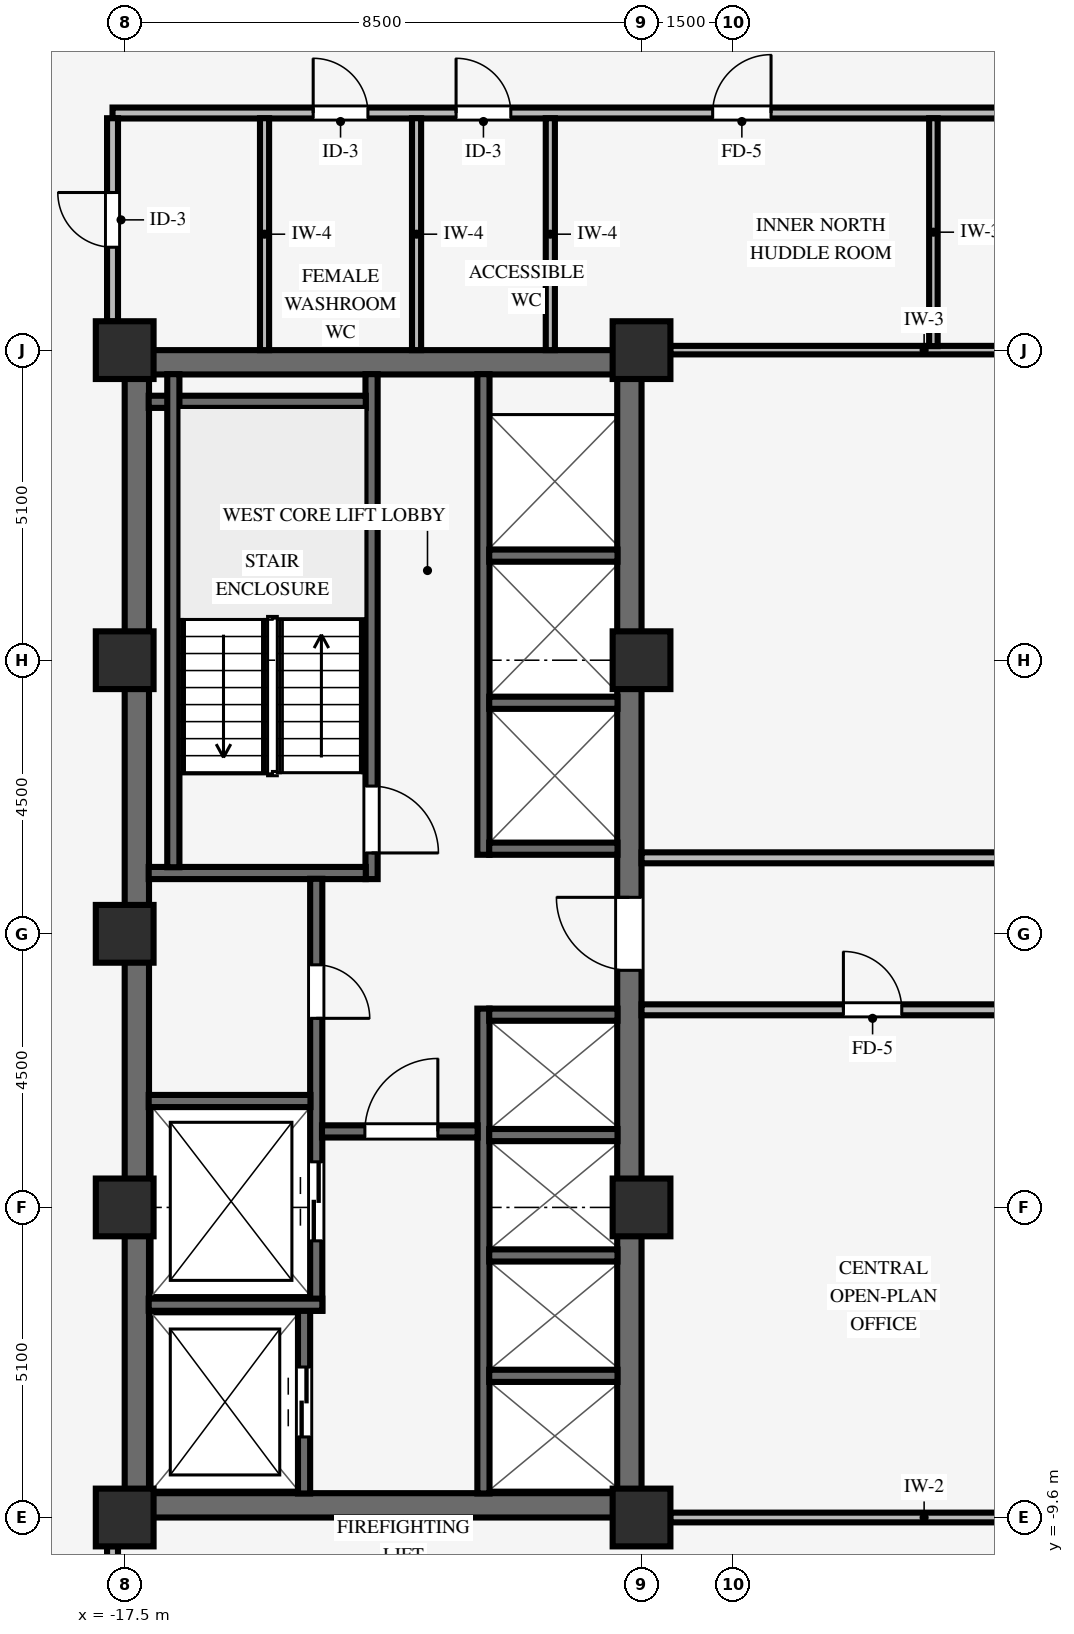
"""IFC4 building model, lengths in metres.
Left out: names, types, materials, properties, quantities, classifications, styles, units other than length and angle.
Written with IfcOpenShell. Run it as: python <this file> out.ifc"""

import sys

from ifc_helpers import new_model, si_unit, direction, frame, frame_2d, origin, origin_2d, place, context, subcontext, project, spatial, rectangle, extrude, source, transform, mapped, element, fill, save


model = new_model("IFC4")
c1 = context("Model", 3, precision=1e-05, world=origin(), true_north=direction((0.0, 1.0)))
c2 = subcontext(c1, "Body", "Model", "MODEL_VIEW")
j1 = project(units=[si_unit("LENGTHUNIT", "METRE"), si_unit("PLANEANGLEUNIT", "RADIAN")], contexts=[c1])
p1 = place(None, origin())
s1 = spatial("IfcSite", under=j1, at=p1, CompositionType="ELEMENT")
p2 = place(p1, origin())
s2 = spatial("IfcBuilding", under=s1, at=p2, CompositionType="ELEMENT")
p3 = place(p2, frame((0.0, 0.0, 123.85)))
s3 = spatial("IfcBuildingStorey", under=s2, at=p3, CompositionType="ELEMENT", Elevation=123.85)
for number, where, z_axis, x_axis in (
    (1, (-17.5, -9.4, 0.0), (0.0, 0.0, 1.0), (1.0, 0.0, 0.0)),
    (2, (-17.5, 9.4, 0.0), (0.0, 0.0, 1.0), (1.0, 0.0, 0.0)),
):
    element("IfcWall", number, at=place(p3, frame(where, z_axis=z_axis, x_axis=x_axis)), inside=s3, PredefinedType="SHEAR", context=c2, shape_type="SweptSolid", body=[
        extrude(rectangle(XDim=8.5, YDim=0.4, at=frame_2d((4.25, 0.0))), origin(), (0.0, 0.0, 1.0), 3.37),
    ])
p4 = place(p3, frame((-17.3, -9.205, 0.0), z_axis=(0.0, 0.0, 1.0), x_axis=(0.0, 1.0, 0.0)))
e3 = element("IfcWall", 3, at=p4, inside=s3, PredefinedType="SHEAR", context=c2, shape_type="SweptSolid", body=[
    extrude(rectangle(XDim=18.41, YDim=0.4, at=frame_2d((9.205, 0.0))), origin(), (0.0, 0.0, 1.0), 3.37),
])
p5 = place(p3, frame((-9.2, -9.205, 0.0), z_axis=(0.0, 0.0, 1.0), x_axis=(0.0, 1.0, 0.0)))
e4 = element("IfcWall", 4, at=p5, inside=s3, PredefinedType="SHEAR", context=c2, shape_type="SweptSolid", body=[
    extrude(rectangle(XDim=18.41, YDim=0.4, at=frame_2d((9.205, 0.0))), origin(), (0.0, 0.0, 1.0), 3.37),
])
p6 = place(p5, frame((8.605, 0.0, 0.0)))
e5 = element("IfcOpeningElement", 5, at=p6, cuts=e4, PredefinedType="OPENING", context=c2, shape_type="SweptSolid", body=[
    extrude(rectangle(XDim=1.2, YDim=2.15, at=frame_2d((0.6, 1.075))), frame((0.0, 0.21, 0.0), z_axis=(0.0, -1.0, 0.0), x_axis=(1.0, 0.0, 0.0)), (0.0, 0.0, 1.0), 0.42),
])
for number, where, z_axis, x_axis in (
    (6, (-17.5, -9.6, 0.0), (0.0, 0.0, 1.0), (1.0, 0.0, 0.0)),
    (7, (-17.5, -4.5, 0.0), (0.0, 0.0, 1.0), (1.0, 0.0, 0.0)),
    (8, (-17.5, 4.5, 0.0), (0.0, 0.0, 1.0), (1.0, 0.0, 0.0)),
    (9, (-17.5, 9.6, 0.0), (0.0, 0.0, 1.0), (1.0, 0.0, 0.0)),
    (10, (-9.0, -9.6, 0.0), (0.0, 0.0, 1.0), (1.0, 0.0, 0.0)),
    (11, (-9.0, -4.5, 0.0), (0.0, 0.0, 1.0), (1.0, 0.0, 0.0)),
    (12, (-9.0, 4.5, 0.0), (0.0, 0.0, 1.0), (1.0, 0.0, 0.0)),
    (13, (-9.0, 9.6, 0.0), (0.0, 0.0, 1.0), (1.0, 0.0, 0.0)),
    (14, (-17.5, 0.0, 0.0), (0.0, 0.0, 1.0), (1.0, 0.0, 0.0)),
):
    element("IfcColumn", number, at=place(p3, frame(where, z_axis=z_axis, x_axis=x_axis)), inside=s3, PredefinedType="COLUMN", context=c2, shape_type="SweptSolid", body=[
        extrude(rectangle(XDim=0.95, YDim=0.95, at=origin_2d()), origin(), (0.0, 0.0, 1.0), 3.37),
    ])
p7 = place(p3, frame((-13.44, 0.9, 0.0), z_axis=(0.0, 0.0, 1.0), x_axis=(0.0, 1.0, 0.0)))
e15 = element("IfcWall", 15, at=p7, inside=s3, PredefinedType="SHEAR", context=c2, shape_type="SweptSolid", body=[
    extrude(rectangle(XDim=8.305, YDim=0.2, at=frame_2d((4.153, 0.0))), origin(), (0.0, 0.0, 1.0), 3.37),
])
p8 = place(p7, frame((1.53, 0.0, 0.0), z_axis=(0.0, 0.0, 1.0), x_axis=(-1.0, 0.0, 0.0)))
e16 = element("IfcOpeningElement", 16, at=p8, cuts=e15, PredefinedType="OPENING", context=c2, shape_type="SweptSolid", body=[
    extrude(rectangle(XDim=1.1, YDim=2.15, at=frame_2d((0.55, 1.075))), frame((0.0, 0.11, 0.0), z_axis=(0.0, -1.0, 0.0), x_axis=(1.0, 0.0, 0.0)), (0.0, 0.0, 1.0), 0.22),
])
for number, where, z_axis, x_axis in (
    (17, (-17.105, 1.0, 0.0), (0.0, 0.0, 1.0), (1.0, 0.0, 0.0)),
    (18, (-17.105, 8.75, 0.0), (0.0, 0.0, 1.0), (1.0, 0.0, 0.0)),
):
    element("IfcWall", number, at=place(p3, frame(where, z_axis=z_axis, x_axis=x_axis)), inside=s3, PredefinedType="SHEAR", context=c2, shape_type="SweptSolid", body=[
        extrude(rectangle(XDim=3.57, YDim=0.2, at=frame_2d((1.785, 0.0))), origin(), (0.0, 0.0, 1.0), 3.37),
    ])
p9 = place(p3, frame((-16.7, 1.095, 0.0), z_axis=(0.0, 0.0, 1.0), x_axis=(0.0, 1.0, 0.0)))
e19 = element("IfcWall", 19, at=p9, inside=s3, PredefinedType="SHEAR", context=c2, shape_type="SweptSolid", body=[
    extrude(rectangle(XDim=8.11, YDim=0.2, at=frame_2d((4.055, 0.0))), origin(), (0.0, 0.0, 1.0), 3.37),
])
p10 = place(p3, frame((-14.55, -9.205, 0.0), z_axis=(0.0, 0.0, 1.0), x_axis=(0.0, 1.0, 0.0)))
e20 = element("IfcWall", 20, at=p10, inside=s3, PredefinedType="SHEAR", context=c2, shape_type="SweptSolid", body=[
    extrude(rectangle(XDim=3.01, YDim=0.2, at=frame_2d((1.505, 0.0))), origin(), (0.0, 0.0, 1.0), 3.37),
])
p11 = place(p10, frame((0.93, 0.0, 0.0)))
e21 = element("IfcOpeningElement", 21, at=p11, cuts=e20, PredefinedType="OPENING", context=c2, shape_type="SweptSolid", body=[
    extrude(rectangle(XDim=1.15, YDim=2.15, at=frame_2d((0.575, 1.075))), frame((0.0, 0.11, 0.0), z_axis=(0.0, -1.0, 0.0), x_axis=(1.0, 0.0, 0.0)), (0.0, 0.0, 1.0), 0.22),
])
p12 = place(p3, frame((-14.35, -6.2, 0.0), z_axis=(0.0, 0.0, 1.0), x_axis=(0.0, 1.0, 0.0)))
e22 = element("IfcWall", 22, at=p12, inside=s3, PredefinedType="SHEAR", context=c2, shape_type="SweptSolid", body=[
    extrude(rectangle(XDim=7.105, YDim=0.2, at=frame_2d((3.552, 0.0))), origin(), (0.0, 0.0, 1.0), 3.37),
])
p13 = place(p12, frame((5.69, 0.0, 0.0), z_axis=(0.0, 0.0, 1.0), x_axis=(-1.0, 0.0, 0.0)))
e23 = element("IfcOpeningElement", 23, at=p13, cuts=e22, PredefinedType="OPENING", context=c2, shape_type="SweptSolid", body=[
    extrude(rectangle(XDim=0.88, YDim=2.1, at=frame_2d((0.44, 1.05))), frame((0.0, 0.11, 0.0), z_axis=(0.0, -1.0, 0.0), x_axis=(1.0, 0.0, 0.0)), (0.0, 0.0, 1.0), 0.22),
])
p14 = place(p12, frame((1.15, 0.0, 0.0)))
e24 = element("IfcOpeningElement", 24, at=p14, cuts=e22, PredefinedType="OPENING", context=c2, shape_type="SweptSolid", body=[
    extrude(rectangle(XDim=1.3, YDim=2.2, at=frame_2d((0.65, 1.1))), frame((0.0, 0.11, 0.0), z_axis=(0.0, -1.0, 0.0), x_axis=(1.0, 0.0, 0.0)), (0.0, 0.0, 1.0), 0.22),
])
p15 = place(p3, frame((-17.105, -6.1, 0.0), z_axis=(0.0, 0.0, 1.0), x_axis=(1.0, 0.0, 0.0)))
e25 = element("IfcWall", 25, at=p15, inside=s3, PredefinedType="SHEAR", context=c2, shape_type="SweptSolid", body=[
    extrude(rectangle(XDim=2.855, YDim=0.2, at=frame_2d((1.427, 0.0))), origin(), (0.0, 0.0, 1.0), 3.37),
])
p16 = place(p3, frame((-17.105, -2.75, 0.0), z_axis=(0.0, 0.0, 1.0), x_axis=(1.0, 0.0, 0.0)))
e26 = element("IfcWall", 26, at=p16, inside=s3, PredefinedType="SHEAR", context=c2, shape_type="SweptSolid", body=[
    extrude(rectangle(XDim=2.66, YDim=0.2, at=frame_2d((1.33, 0.0))), origin(), (0.0, 0.0, 1.0), 3.37),
])
p17 = place(p3, frame((-11.6, -9.205, 0.0), z_axis=(0.0, 0.0, 1.0), x_axis=(0.0, 1.0, 0.0)))
e27 = element("IfcWall", 27, at=p17, inside=s3, PredefinedType="SHEAR", context=c2, shape_type="SweptSolid", body=[
    extrude(rectangle(XDim=7.975, YDim=0.2, at=frame_2d((3.988, 0.0))), origin(), (0.0, 0.0, 1.0), 3.37),
])
p18 = place(p3, frame((-14.255, -3.25, 0.0), z_axis=(0.0, 0.0, 1.0), x_axis=(1.0, 0.0, 0.0)))
e28 = element("IfcWall", 28, at=p18, inside=s3, PredefinedType="SHEAR", context=c2, shape_type="SweptSolid", body=[
    extrude(rectangle(XDim=2.56, YDim=0.2, at=frame_2d((1.28, 0.0))), origin(), (0.0, 0.0, 1.0), 3.37),
])
p19 = place(p18, frame((0.705, 0.0, 0.0)))
e29 = element("IfcOpeningElement", 29, at=p19, cuts=e28, PredefinedType="OPENING", context=c2, shape_type="SweptSolid", body=[
    extrude(rectangle(XDim=1.2, YDim=2.15, at=frame_2d((0.6, 1.075))), frame((0.0, 0.11, 0.0), z_axis=(0.0, -1.0, 0.0), x_axis=(1.0, 0.0, 0.0)), (0.0, 0.0, 1.0), 0.22),
])
for number, where, z_axis, x_axis in (
    (30, (-11.505, -7.27, 0.0), (0.0, 0.0, 1.0), (1.0, 0.0, 0.0)),
    (31, (-11.505, -5.29, 0.0), (0.0, 0.0, 1.0), (1.0, 0.0, 0.0)),
    (32, (-11.505, -3.31, 0.0), (0.0, 0.0, 1.0), (1.0, 0.0, 0.0)),
    (33, (-11.505, -1.33, 0.0), (0.0, 0.0, 1.0), (1.0, 0.0, 0.0)),
):
    element("IfcWall", number, at=place(p3, frame(where, z_axis=z_axis, x_axis=x_axis)), inside=s3, PredefinedType="SHEAR", context=c2, shape_type="SweptSolid", body=[
        extrude(rectangle(XDim=2.11, YDim=0.2, at=frame_2d((1.055, 0.0))), origin(), (0.0, 0.0, 1.0), 3.37),
    ])
p20 = place(p3, frame((-11.6, 1.3, 0.0), z_axis=(0.0, 0.0, 1.0), x_axis=(0.0, 1.0, 0.0)))
e34 = element("IfcWall", 34, at=p20, inside=s3, PredefinedType="SHEAR", context=c2, shape_type="SweptSolid", body=[
    extrude(rectangle(XDim=7.905, YDim=0.2, at=frame_2d((3.953, 0.0))), origin(), (0.0, 0.0, 1.0), 3.37),
])
for number, where, z_axis, x_axis in (
    (35, (-11.505, 1.4, 0.0), (0.0, 0.0, 1.0), (1.0, 0.0, 0.0)),
    (36, (-11.505, 3.8, 0.0), (0.0, 0.0, 1.0), (1.0, 0.0, 0.0)),
    (37, (-11.505, 6.22, 0.0), (0.0, 0.0, 1.0), (1.0, 0.0, 0.0)),
):
    element("IfcWall", number, at=place(p3, frame(where, z_axis=z_axis, x_axis=x_axis)), inside=s3, PredefinedType="SHEAR", context=c2, shape_type="SweptSolid", body=[
        extrude(rectangle(XDim=2.11, YDim=0.2, at=frame_2d((1.055, 0.0))), origin(), (0.0, 0.0, 1.0), 3.37),
    ])
p21 = place(p3, frame((-8.529, -9.6, 0.0), z_axis=(0.0, 0.0, 1.0), x_axis=(1.0, 0.0, 0.0)))
e38 = element("IfcWall", 38, at=p21, inside=s3, PredefinedType="PARTITIONING", context=c2, shape_type="SweptSolid", body=[
    extrude(rectangle(XDim=8.353, YDim=0.16, at=frame_2d((4.177, 0.0))), origin(), (0.0, 0.0, 1.0), 2.405),
])
p22 = place(p3, frame((-9.0, -1.25, 0.0), z_axis=(0.0, 0.0, 1.0), x_axis=(1.0, 0.0, 0.0)))
e39 = element("IfcWall", 39, at=p22, inside=s3, PredefinedType="PARTITIONING", context=c2, shape_type="SweptSolid", body=[
    extrude(rectangle(XDim=15.6, YDim=0.18, at=frame_2d((7.8, 0.0))), origin(), (0.0, 0.0, 1.0), 3.36),
])
p23 = place(p22, frame((3.32, 0.0, 0.0)))
e40 = element("IfcOpeningElement", 40, at=p23, cuts=e39, PredefinedType="OPENING", context=c2, shape_type="SweptSolid", body=[
    extrude(rectangle(XDim=0.96, YDim=2.1, at=frame_2d((0.48, 1.05))), frame((0.0, 0.1, 0.0), z_axis=(0.0, -1.0, 0.0), x_axis=(1.0, 0.0, 0.0)), (0.0, 0.0, 1.0), 0.2),
])
p24 = place(p3, frame((-9.0, 1.25, 0.0), z_axis=(0.0, 0.0, 1.0), x_axis=(1.0, 0.0, 0.0)))
e41 = element("IfcWall", 41, at=p24, inside=s3, PredefinedType="PARTITIONING", context=c2, shape_type="SweptSolid", body=[
    extrude(rectangle(XDim=15.6, YDim=0.18, at=frame_2d((7.8, 0.0))), origin(), (0.0, 0.0, 1.0), 3.36),
])
p25 = place(p24, frame((7.32, 0.0, 0.0)))
e42 = element("IfcOpeningElement", 42, at=p25, cuts=e41, PredefinedType="OPENING", context=c2, shape_type="SweptSolid", body=[
    extrude(rectangle(XDim=0.96, YDim=2.1, at=frame_2d((0.48, 1.05))), frame((0.0, 0.1, 0.0), z_axis=(0.0, -1.0, 0.0), x_axis=(1.0, 0.0, 0.0)), (0.0, 0.0, 1.0), 0.2),
])
p26 = place(p3, frame((-8.529, 9.6, 0.0), z_axis=(0.0, 0.0, 1.0), x_axis=(1.0, 0.0, 0.0)))
e43 = element("IfcWall", 43, at=p26, inside=s3, PredefinedType="PARTITIONING", context=c2, shape_type="SweptSolid", body=[
    extrude(rectangle(XDim=8.353, YDim=0.14, at=frame_2d((4.177, 0.0))), origin(), (0.0, 0.0, 1.0), 2.405),
])
p27 = place(p3, frame((-17.7, 13.5, 0.0), z_axis=(0.0, 0.0, 1.0), x_axis=(1.0, 0.0, 0.0)))
e44 = element("IfcWall", 44, at=p27, inside=s3, PredefinedType="PARTITIONING", context=c2, shape_type="SweptSolid", body=[
    extrude(rectangle(XDim=24.3, YDim=0.18, at=frame_2d((12.15, 0.0))), origin(), (0.0, 0.0, 1.0), 2.998),
])
p28 = place(p27, frame((18.42, 0.0, 0.0)))
e45 = element("IfcOpeningElement", 45, at=p28, cuts=e44, PredefinedType="OPENING", context=c2, shape_type="SweptSolid", body=[
    extrude(rectangle(XDim=0.96, YDim=2.1, at=frame_2d((0.48, 1.05))), frame((0.0, 0.1, 0.0), z_axis=(0.0, -1.0, 0.0), x_axis=(1.0, 0.0, 0.0)), (0.0, 0.0, 1.0), 0.2),
])
p29 = place(p27, frame((9.87, 0.0, 0.0)))
e46 = element("IfcOpeningElement", 46, at=p29, cuts=e44, PredefinedType="OPENING", context=c2, shape_type="SweptSolid", body=[
    extrude(rectangle(XDim=0.96, YDim=2.1, at=frame_2d((0.48, 1.05))), frame((0.0, 0.1, 0.0), z_axis=(0.0, -1.0, 0.0), x_axis=(1.0, 0.0, 0.0)), (0.0, 0.0, 1.0), 0.2),
])
p30 = place(p27, frame((3.3, 0.0, 0.0)))
e47 = element("IfcOpeningElement", 47, at=p30, cuts=e44, PredefinedType="OPENING", context=c2, shape_type="SweptSolid", body=[
    extrude(rectangle(XDim=0.9, YDim=2.1, at=frame_2d((0.45, 1.05))), frame((0.0, 0.1, 0.0), z_axis=(0.0, -1.0, 0.0), x_axis=(1.0, 0.0, 0.0)), (0.0, 0.0, 1.0), 0.2),
])
p31 = place(p27, frame((5.65, 0.0, 0.0)))
e48 = element("IfcOpeningElement", 48, at=p31, cuts=e44, PredefinedType="OPENING", context=c2, shape_type="SweptSolid", body=[
    extrude(rectangle(XDim=0.9, YDim=2.1, at=frame_2d((0.45, 1.05))), frame((0.0, 0.1, 0.0), z_axis=(0.0, -1.0, 0.0), x_axis=(1.0, 0.0, 0.0)), (0.0, 0.0, 1.0), 0.2),
])
p32 = place(p3, frame((-17.7, -13.414, 0.0), z_axis=(0.0, 0.0, 1.0), x_axis=(0.0, 1.0, 0.0)))
e49 = element("IfcWall", 49, at=p32, inside=s3, PredefinedType="PARTITIONING", context=c2, shape_type="SweptSolid", body=[
    extrude(rectangle(XDim=3.343, YDim=0.18, at=frame_2d((1.671, 0.0))), origin(), (0.0, 0.0, 1.0), 2.816),
])
p33 = place(p3, frame((-17.7, 10.071, 0.0), z_axis=(0.0, 0.0, 1.0), x_axis=(0.0, 1.0, 0.0)))
e50 = element("IfcWall", 50, at=p33, inside=s3, PredefinedType="PARTITIONING", context=c2, shape_type="SweptSolid", body=[
    extrude(rectangle(XDim=3.343, YDim=0.18, at=frame_2d((1.671, 0.0))), origin(), (0.0, 0.0, 1.0), 2.816),
])
p34 = place(p33, frame((1.221, 0.0, 0.0)))
e51 = element("IfcOpeningElement", 51, at=p34, cuts=e50, PredefinedType="OPENING", context=c2, shape_type="SweptSolid", body=[
    extrude(rectangle(XDim=0.9, YDim=2.1, at=frame_2d((0.45, 1.05))), frame((0.0, 0.1, 0.0), z_axis=(0.0, -1.0, 0.0), x_axis=(1.0, 0.0, 0.0)), (0.0, 0.0, 1.0), 0.2),
])
for number, where, z_axis, x_axis in (
    (52, (-15.2, 9.6, 0.0), (0.0, 0.0, 1.0), (0.0, 1.0, 0.0)),
    (53, (-12.7, 9.6, 0.0), (0.0, 0.0, 1.0), (0.0, 1.0, 0.0)),
    (54, (-10.5, 9.6, 0.0), (0.0, 0.0, 1.0), (0.0, 1.0, 0.0)),
):
    element("IfcWall", number, at=place(p3, frame(where, z_axis=z_axis, x_axis=x_axis)), inside=s3, PredefinedType="PARTITIONING", context=c2, shape_type="SweptSolid", body=[
        extrude(rectangle(XDim=3.814, YDim=0.15, at=frame_2d((1.907, 0.0))), origin(), (0.0, 0.0, 1.0), 3.36),
    ])
p35 = place(p3, frame((-4.2, 9.666, 0.0), z_axis=(0.0, 0.0, 1.0), x_axis=(0.0, 1.0, 0.0)))
e55 = element("IfcWall", 55, at=p35, inside=s3, PredefinedType="PARTITIONING", context=c2, shape_type="SweptSolid", body=[
    extrude(rectangle(XDim=3.748, YDim=0.14, at=frame_2d((1.874, 0.0))), origin(), (0.0, 0.0, 1.0), 3.36),
])
m1 = source(origin(), c2, "Body", "SweptSolid", [
    extrude(rectangle(XDim=1.1, YDim=2.15, at=frame_2d((0.55, 1.075))), frame((0.0, 0.025, 0.0), z_axis=(0.0, -1.0, 0.0), x_axis=(1.0, 0.0, 0.0)), (0.0, 0.0, 1.0), 0.05),
])
p36 = place(p8, origin())
e56 = element("IfcDoor", 56, at=p36, inside=s3, OperationType="SINGLE_SWING_RIGHT", PredefinedType="DOOR", context=c2, shape_type="MappedRepresentation", body=[
    mapped(m1, transform((0.0, 0.0, 0.0), scale=1.0)),
])
fill(e16, e56)
m2 = source(origin(), c2, "Body", "SweptSolid", [
    extrude(rectangle(XDim=0.88, YDim=2.1, at=frame_2d((0.44, 1.05))), frame((0.0, 0.025, 0.0), z_axis=(0.0, -1.0, 0.0), x_axis=(1.0, 0.0, 0.0)), (0.0, 0.0, 1.0), 0.05),
])
p37 = place(p13, origin())
e57 = element("IfcDoor", 57, at=p37, inside=s3, OperationType="SINGLE_SWING_RIGHT", PredefinedType="DOOR", context=c2, shape_type="MappedRepresentation", body=[
    mapped(m2, transform((0.0, 0.0, 0.0), scale=1.0)),
])
fill(e23, e57)
m3 = source(origin(), c2, "Body", "SweptSolid", [
    extrude(rectangle(XDim=1.2, YDim=2.15, at=frame_2d((0.6, 1.075))), frame((0.0, 0.025, 0.0), z_axis=(0.0, -1.0, 0.0), x_axis=(1.0, 0.0, 0.0)), (0.0, 0.0, 1.0), 0.05),
])
p38 = place(p19, origin())
e58 = element("IfcDoor", 58, at=p38, inside=s3, OperationType="SINGLE_SWING_RIGHT", PredefinedType="DOOR", context=c2, shape_type="MappedRepresentation", body=[
    mapped(m3, transform((0.0, 0.0, 0.0), scale=1.0)),
])
fill(e29, e58)
p39 = place(p6, origin())
e59 = element("IfcDoor", 59, at=p39, inside=s3, OperationType="SINGLE_SWING_RIGHT", PredefinedType="DOOR", context=c2, shape_type="MappedRepresentation", body=[
    mapped(m3, transform((0.0, 0.0, 0.0), scale=1.0)),
])
fill(e5, e59)
m4 = source(origin(), c2, "Body", "SweptSolid", [
    extrude(rectangle(XDim=1.15, YDim=2.15, at=frame_2d((0.575, 1.075))), frame((0.0, 0.025, 0.0), z_axis=(0.0, -1.0, 0.0), x_axis=(1.0, 0.0, 0.0)), (0.0, 0.0, 1.0), 0.05),
])
p40 = place(p11, origin())
e60 = element("IfcDoor", 60, at=p40, inside=s3, OperationType="DOUBLE_DOOR_SLIDING", PredefinedType="DOOR", context=c2, shape_type="MappedRepresentation", body=[
    mapped(m4, transform((0.0, 0.0, 0.0), scale=1.0)),
])
fill(e21, e60)
m5 = source(origin(), c2, "Body", "SweptSolid", [
    extrude(rectangle(XDim=1.3, YDim=2.2, at=frame_2d((0.65, 1.1))), frame((0.0, 0.025, 0.0), z_axis=(0.0, -1.0, 0.0), x_axis=(1.0, 0.0, 0.0)), (0.0, 0.0, 1.0), 0.05),
])
p41 = place(p14, origin())
e61 = element("IfcDoor", 61, at=p41, inside=s3, OperationType="DOUBLE_DOOR_SLIDING", PredefinedType="DOOR", context=c2, shape_type="MappedRepresentation", body=[
    mapped(m5, transform((0.0, 0.0, 0.0), scale=1.0)),
])
fill(e24, e61)
m6 = source(origin(), c2, "Body", "SweptSolid", [
    extrude(rectangle(XDim=0.96, YDim=2.1, at=frame_2d((0.48, 1.05))), frame((0.0, 0.025, 0.0), z_axis=(0.0, -1.0, 0.0), x_axis=(1.0, 0.0, 0.0)), (0.0, 0.0, 1.0), 0.05),
])
p42 = place(p23, origin())
e62 = element("IfcDoor", 62, at=p42, inside=s3, OperationType="SINGLE_SWING_LEFT", PredefinedType="DOOR", context=c2, shape_type="MappedRepresentation", body=[
    mapped(m6, transform((0.0, 0.0, 0.0), scale=1.0)),
])
fill(e40, e62)
p43 = place(p29, origin())
e63 = element("IfcDoor", 63, at=p43, inside=s3, OperationType="SINGLE_SWING_RIGHT", PredefinedType="DOOR", context=c2, shape_type="MappedRepresentation", body=[
    mapped(m6, transform((0.0, 0.0, 0.0), scale=1.0)),
])
fill(e46, e63)
m7 = source(origin(), c2, "Body", "SweptSolid", [
    extrude(rectangle(XDim=0.9, YDim=2.1, at=frame_2d((0.45, 1.05))), frame((0.0, 0.025, 0.0), z_axis=(0.0, -1.0, 0.0), x_axis=(1.0, 0.0, 0.0)), (0.0, 0.0, 1.0), 0.05),
])
p44 = place(p34, origin())
e64 = element("IfcDoor", 64, at=p44, inside=s3, OperationType="SINGLE_SWING_RIGHT", PredefinedType="DOOR", context=c2, shape_type="MappedRepresentation", body=[
    mapped(m7, transform((0.0, 0.0, 0.0), scale=1.0)),
])
fill(e51, e64)
p45 = place(p30, origin())
e65 = element("IfcDoor", 65, at=p45, inside=s3, OperationType="SINGLE_SWING_LEFT", PredefinedType="DOOR", context=c2, shape_type="MappedRepresentation", body=[
    mapped(m7, transform((0.0, 0.0, 0.0), scale=1.0)),
])
fill(e47, e65)
p46 = place(p31, origin())
e66 = element("IfcDoor", 66, at=p46, inside=s3, OperationType="SINGLE_SWING_LEFT", PredefinedType="DOOR", context=c2, shape_type="MappedRepresentation", body=[
    mapped(m7, transform((0.0, 0.0, 0.0), scale=1.0)),
])
fill(e48, e66)
save(model, sys.argv[1])
